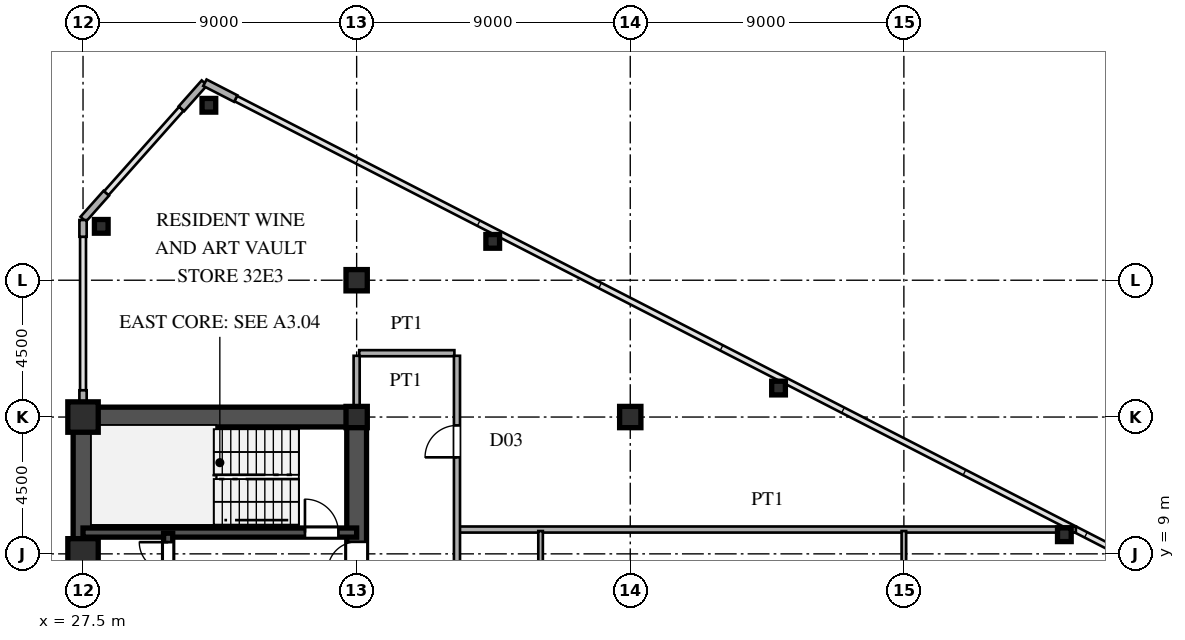
"""IFC4 building model, lengths in metres.
Left out: names, types, materials, properties, quantities, classifications, styles, units other than length and angle.
Written with IfcOpenShell. Run it as: python <this file> out.ifc"""

import sys

from ifc_helpers import new_model, si_unit, direction, frame, frame_2d, origin, origin_2d, place, context, subcontext, project, spatial, rectangle, hollow_rectangle, i_section, extrude, source, transform, mapped, element, fill, save


model = new_model("IFC4")
c1 = context("Model", 3, precision=1e-05, world=origin(), true_north=direction((0.0, 1.0)))
c2 = subcontext(c1, "Body", "Model", "MODEL_VIEW")
j1 = project(units=[si_unit("LENGTHUNIT", "METRE"), si_unit("PLANEANGLEUNIT", "RADIAN")], contexts=[c1])
p1 = place(None, origin())
s1 = spatial("IfcSite", under=j1, at=p1, CompositionType="ELEMENT")
p2 = place(p1, origin())
s2 = spatial("IfcBuilding", under=s1, at=p2, CompositionType="ELEMENT")
p3 = place(p2, frame((0.0, 0.0, 121.2)))
s3 = spatial("IfcBuildingStorey", under=s2, at=p3, CompositionType="ELEMENT", Elevation=121.2)
m1 = source(origin(), c2, "Body", "SweptSolid", [
    extrude(hollow_rectangle(XDim=1.0, YDim=1.0, WallThickness=0.042, at=origin_2d()), origin(), (0.0, 0.0, 1.0), 3.6),
])
for number, where, z_axis, x_axis in (
    (1, (27.5, 9.0, 0.0), (0.0, 0.0, 1.0), (1.0, 0.0, 0.0)),
    (2, (27.5, 13.5, 0.0), (0.0, 0.0, 1.0), (1.0, 0.0, 0.0)),
):
    element("IfcColumn", number, at=place(p3, frame(where, z_axis=z_axis, x_axis=x_axis)), inside=s3, PredefinedType="COLUMN", context=c2, shape_type="MappedRepresentation", body=[
        mapped(m1, transform((0.0, 0.0, 0.0), scale=1.0)),
    ])
m2 = source(origin(), c2, "Body", "SweptSolid", [
    extrude(i_section(OverallWidth=0.7, OverallDepth=0.7, WebThickness=0.028, FlangeThickness=0.045, at=origin_2d()), origin(), (0.0, 0.0, 1.0), 3.6),
])
for number, where, z_axis, x_axis in (
    (3, (36.5, 13.5, 0.0), (0.0, 0.0, 1.0), (1.0, 0.0, 0.0)),
    (4, (36.5, 18.0, 0.0), (0.0, 0.0, 1.0), (1.0, 0.0, 0.0)),
    (5, (45.5, 13.5, 0.0), (0.0, 0.0, 1.0), (1.0, 0.0, 0.0)),
):
    element("IfcColumn", number, at=place(p3, frame(where, z_axis=z_axis, x_axis=x_axis)), inside=s3, PredefinedType="COLUMN", context=c2, shape_type="MappedRepresentation", body=[
        mapped(m2, transform((0.0, 0.0, 0.0), scale=1.0)),
    ])
m3 = source(origin(), c2, "Body", "SweptSolid", [
    extrude(hollow_rectangle(XDim=0.45, YDim=0.45, WallThickness=0.018, at=origin_2d()), origin(), (0.0, 0.0, 1.0), 3.6),
])
for number, where, z_axis, x_axis in (
    (6, (31.64, 23.754, 0.0), (0.0, 0.0, 1.0), (1.0, 0.0, 0.0)),
    (7, (28.1, 19.772, 0.0), (0.0, 0.0, 1.0), (1.0, 0.0, 0.0)),
    (8, (40.976, 19.278, 0.0), (0.0, 0.0, 1.0), (1.0, 0.0, 0.0)),
    (9, (50.377, 14.453, 0.0), (0.0, 0.0, 1.0), (1.0, 0.0, 0.0)),
    (10, (59.779, 9.629, 0.0), (0.0, 0.0, 1.0), (1.0, 0.0, 0.0)),
):
    element("IfcColumn", number, at=place(p3, frame(where, z_axis=z_axis, x_axis=x_axis)), inside=s3, PredefinedType="COLUMN", context=c2, shape_type="MappedRepresentation", body=[
        mapped(m3, transform((0.0, 0.0, 0.0), scale=1.0)),
    ])
p4 = place(p3, frame((32.523, 23.975, 0.0), z_axis=(0.0, 0.0, 1.0), x_axis=(-0.889797395748, 0.456355776255, 0.0)))
e11 = element("IfcWall", 11, at=p4, inside=s3, PredefinedType="SOLIDWALL", context=c2, shape_type="SweptSolid", body=[
    extrude(rectangle(XDim=1.14, YDim=0.24, at=frame_2d((0.57, 0.0))), origin(), (0.0, 0.0, 1.0), 3.38),
])
for number, where, z_axis, x_axis in (
    (12, (31.493, 24.492, 0.0), (0.0, 0.0, 1.0), (-0.664, -0.747, 0.0)),
    (13, (28.264, 20.86, 0.0), (0.0, 0.0, 1.0), (-0.664, -0.747, 0.0)),
):
    element("IfcWall", number, at=place(p3, frame(where, z_axis=z_axis, x_axis=x_axis)), inside=s3, PredefinedType="SOLIDWALL", context=c2, shape_type="SweptSolid", body=[
        extrude(rectangle(XDim=1.14, YDim=0.24, at=frame_2d((0.57, 0.0))), origin(), (0.0, 0.0, 1.0), 3.38),
    ])
p5 = place(p3, frame((27.5, 13.83, 0.0), z_axis=(0.0, 0.0, 1.0), x_axis=(0.0, 1.0, 0.0)))
e14 = element("IfcWall", 14, at=p5, inside=s3, PredefinedType="SOLIDWALL", context=c2, shape_type="SweptSolid", body=[
    extrude(rectangle(XDim=0.55, YDim=0.24, at=frame_2d((0.275, 0.0))), origin(), (0.0, 0.0, 1.0), 2.88),
])
p6 = place(p3, frame((27.5, 19.43, 0.0), z_axis=(0.0, 0.0, 1.0), x_axis=(0.0, 1.0, 0.0)))
e15 = element("IfcWall", 15, at=p6, inside=s3, PredefinedType="SOLIDWALL", context=c2, shape_type="SweptSolid", body=[
    extrude(rectangle(XDim=0.55, YDim=0.24, at=frame_2d((0.275, 0.0))), origin(), (0.0, 0.0, 1.0), 3.38),
])
p7 = place(p3, frame((27.5, 1.3, 0.0), z_axis=(0.0, 0.0, 1.0), x_axis=(0.0, 1.0, 0.0)))
e16 = element("IfcWall", 16, at=p7, inside=s3, PredefinedType="SHEAR", context=c2, shape_type="SweptSolid", body=[
    extrude(rectangle(XDim=12.2, YDim=0.65, at=frame_2d((6.1, 0.0))), origin(), (0.0, 0.0, 1.0), 3.38),
])
p8 = place(p3, frame((27.5, 13.5, 0.0), z_axis=(0.0, 0.0, 1.0), x_axis=(1.0, 0.0, 0.0)))
e17 = element("IfcWall", 17, at=p8, inside=s3, PredefinedType="SHEAR", context=c2, shape_type="SweptSolid", body=[
    extrude(rectangle(XDim=9.0, YDim=0.65, at=frame_2d((4.5, 0.0))), origin(), (0.0, 0.0, 1.0), 3.38),
])
p9 = place(p3, frame((36.5, 8.2, 0.0), z_axis=(0.0, 0.0, 1.0), x_axis=(0.0, 1.0, 0.0)))
e18 = element("IfcWall", 18, at=p9, inside=s3, PredefinedType="SHEAR", context=c2, shape_type="SweptSolid", body=[
    extrude(rectangle(XDim=5.45, YDim=0.65, at=frame_2d((2.725, 0.0))), origin(), (0.0, 0.0, 1.0), 3.38),
])
p10 = place(p9, frame((0.245, 0.0, 0.0)))
e19 = element("IfcOpeningElement", 19, at=p10, cuts=e18, PredefinedType="OPENING", context=c2, shape_type="SweptSolid", body=[
    extrude(rectangle(XDim=0.95, YDim=2.15, at=frame_2d((0.475, 1.075))), frame((0.0, 0.335, 0.0), z_axis=(0.0, -1.0, 0.0), x_axis=(1.0, 0.0, 0.0)), (0.0, 0.0, 1.0), 0.67),
])
p11 = place(p3, frame((27.5, 9.7, 0.0), z_axis=(0.0, 0.0, 1.0), x_axis=(1.0, 0.0, 0.0)))
e20 = element("IfcWall", 20, at=p11, inside=s3, PredefinedType="SHEAR", context=c2, shape_type="SweptSolid", body=[
    extrude(rectangle(XDim=9.0, YDim=0.3, at=frame_2d((4.5, 0.0))), origin(), (0.0, 0.0, 1.0), 3.38),
])
p12 = place(p11, frame((7.3, 0.0, 0.0)))
e21 = element("IfcOpeningElement", 21, at=p12, cuts=e20, PredefinedType="OPENING", context=c2, shape_type="SweptSolid", body=[
    extrude(rectangle(XDim=1.1, YDim=2.2, at=frame_2d((0.55, 1.1))), frame((0.0, 0.16, 0.0), z_axis=(0.0, -1.0, 0.0), x_axis=(1.0, 0.0, 0.0)), (0.0, 0.0, 1.0), 0.32),
])
p13 = place(p3, frame((30.3, 8.15, 0.0), z_axis=(0.0, 0.0, 1.0), x_axis=(0.0, 1.0, 0.0)))
e22 = element("IfcWall", 22, at=p13, inside=s3, PredefinedType="SHEAR", context=c2, shape_type="SweptSolid", body=[
    extrude(rectangle(XDim=1.53, YDim=0.3, at=frame_2d((0.765, 0.0))), origin(), (0.0, 0.0, 1.0), 3.38),
])
p14 = place(p13, frame((0.285, 0.0, 0.0)))
e23 = element("IfcOpeningElement", 23, at=p14, cuts=e22, PredefinedType="OPENING", context=c2, shape_type="SweptSolid", body=[
    extrude(rectangle(XDim=0.95, YDim=2.15, at=frame_2d((0.475, 1.075))), frame((0.0, 0.16, 0.0), z_axis=(0.0, -1.0, 0.0), x_axis=(1.0, 0.0, 0.0)), (0.0, 0.0, 1.0), 0.32),
])
p15 = place(p3, frame((39.88, 9.8, 0.0), z_axis=(0.0, 0.0, 1.0), x_axis=(1.0, 0.0, 0.0)))
e24 = element("IfcWall", 24, at=p15, inside=s3, PredefinedType="PARTITIONING", context=c2, shape_type="SweptSolid", body=[
    extrude(rectangle(XDim=20.277, YDim=0.2, at=frame_2d((10.139, 0.0))), origin(), (0.0, 0.0, 1.0), 3.38),
])
p16 = place(p3, frame((36.585, 15.6, 0.0), z_axis=(0.0, 0.0, 1.0), x_axis=(1.0, 0.0, 0.0)))
e25 = element("IfcWall", 25, at=p16, inside=s3, PredefinedType="PARTITIONING", context=c2, shape_type="SweptSolid", body=[
    extrude(rectangle(XDim=3.13, YDim=0.2, at=frame_2d((1.565, 0.0))), origin(), (0.0, 0.0, 1.0), 3.38),
])
p17 = place(p3, frame((36.5, 13.83, 0.0), z_axis=(0.0, 0.0, 1.0), x_axis=(0.0, 1.0, 0.0)))
e26 = element("IfcWall", 26, at=p17, inside=s3, PredefinedType="PARTITIONING", context=c2, shape_type="SweptSolid", body=[
    extrude(rectangle(XDim=1.685, YDim=0.2, at=frame_2d((0.842, 0.0))), origin(), (0.0, 0.0, 1.0), 2.78),
])
p18 = place(p3, frame((39.8, -15.515, 0.0), z_axis=(0.0, 0.0, 1.0), x_axis=(0.0, 1.0, 0.0)))
e27 = element("IfcWall", 27, at=p18, inside=s3, PredefinedType="PARTITIONING", context=c2, shape_type="SweptSolid", body=[
    extrude(rectangle(XDim=31.03, YDim=0.2, at=frame_2d((15.515, 0.0))), origin(), (0.0, 0.0, 1.0), 3.38),
])
p19 = place(p18, frame((5.762, 0.0, 0.0)))
e28 = element("IfcOpeningElement", 28, at=p19, cuts=e27, PredefinedType="OPENING", context=c2, shape_type="SweptSolid", body=[
    extrude(rectangle(XDim=1.05, YDim=2.25, at=frame_2d((0.525, 1.125))), frame((0.0, 0.11, 0.0), z_axis=(0.0, -1.0, 0.0), x_axis=(1.0, 0.0, 0.0)), (0.0, 0.0, 1.0), 0.22),
])
p20 = place(p18, frame((18.301, 0.0, 0.0)))
e29 = element("IfcOpeningElement", 29, at=p20, cuts=e27, PredefinedType="OPENING", context=c2, shape_type="SweptSolid", body=[
    extrude(rectangle(XDim=1.05, YDim=2.25, at=frame_2d((0.525, 1.125))), frame((0.0, 0.11, 0.0), z_axis=(0.0, -1.0, 0.0), x_axis=(1.0, 0.0, 0.0)), (0.0, 0.0, 1.0), 0.22),
])
p21 = place(p18, frame((27.69, 0.0, 0.0)))
e30 = element("IfcOpeningElement", 30, at=p21, cuts=e27, PredefinedType="OPENING", context=c2, shape_type="SweptSolid", body=[
    extrude(rectangle(XDim=1.05, YDim=2.25, at=frame_2d((0.525, 1.125))), frame((0.0, 0.11, 0.0), z_axis=(0.0, -1.0, 0.0), x_axis=(1.0, 0.0, 0.0)), (0.0, 0.0, 1.0), 0.22),
])
p22 = place(p3, frame((42.55, 6.072, 0.0), z_axis=(0.0, 0.0, 1.0), x_axis=(0.0, 1.0, 0.0)))
e31 = element("IfcWall", 31, at=p22, inside=s3, PredefinedType="PARTITIONING", context=c2, shape_type="SweptSolid", body=[
    extrude(rectangle(XDim=3.678, YDim=0.15, at=frame_2d((1.839, 0.0))), origin(), (0.0, 0.0, 1.0), 3.38),
])
p23 = place(p3, frame((54.5, -12.732, 0.0), z_axis=(0.0, 0.0, 1.0), x_axis=(0.0, 1.0, 0.0)))
e32 = element("IfcWall", 32, at=p23, inside=s3, PredefinedType="PARTITIONING", context=c2, shape_type="SweptSolid", body=[
    extrude(rectangle(XDim=22.482, YDim=0.15, at=frame_2d((11.241, 0.0))), origin(), (0.0, 0.0, 1.0), 2.78),
])
p24 = place(p23, frame((1.837, 0.0, 0.0)))
e33 = element("IfcOpeningElement", 33, at=p24, cuts=e32, PredefinedType="OPENING", context=c2, shape_type="SweptSolid", body=[
    extrude(rectangle(XDim=0.95, YDim=2.15, at=frame_2d((0.475, 1.075))), frame((0.0, 0.085, 0.0), z_axis=(0.0, -1.0, 0.0), x_axis=(1.0, 0.0, 0.0)), (0.0, 0.0, 1.0), 0.17),
])
p25 = place(p23, frame((6.785, 0.0, 0.0)))
e34 = element("IfcOpeningElement", 34, at=p25, cuts=e32, PredefinedType="OPENING", context=c2, shape_type="SweptSolid", body=[
    extrude(rectangle(XDim=0.95, YDim=2.15, at=frame_2d((0.475, 1.075))), frame((0.0, 0.085, 0.0), z_axis=(0.0, -1.0, 0.0), x_axis=(1.0, 0.0, 0.0)), (0.0, 0.0, 1.0), 0.17),
])
p26 = place(p23, frame((15.757, 0.0, 0.0)))
e35 = element("IfcOpeningElement", 35, at=p26, cuts=e32, PredefinedType="OPENING", context=c2, shape_type="SweptSolid", body=[
    extrude(rectangle(XDim=0.95, YDim=2.15, at=frame_2d((0.475, 1.075))), frame((0.0, 0.085, 0.0), z_axis=(0.0, -1.0, 0.0), x_axis=(1.0, 0.0, 0.0)), (0.0, 0.0, 1.0), 0.17),
])
m4 = source(origin(), c2, "Body", "SweptSolid", [
    extrude(rectangle(XDim=0.95, YDim=2.15, at=frame_2d((0.475, 1.075))), frame((0.0, 0.025, 0.0), z_axis=(0.0, -1.0, 0.0), x_axis=(1.0, 0.0, 0.0)), (0.0, 0.0, 1.0), 0.05),
])
p27 = place(p10, origin())
e36 = element("IfcDoor", 36, at=p27, inside=s3, OperationType="SINGLE_SWING_LEFT", PredefinedType="DOOR", context=c2, shape_type="MappedRepresentation", body=[
    mapped(m4, transform((0.0, 0.0, 0.0), scale=1.0)),
])
fill(e19, e36)
m5 = source(origin(), c2, "Body", "SweptSolid", [
    extrude(rectangle(XDim=1.1, YDim=2.2, at=frame_2d((0.55, 1.1))), frame((0.0, 0.025, 0.0), z_axis=(0.0, -1.0, 0.0), x_axis=(1.0, 0.0, 0.0)), (0.0, 0.0, 1.0), 0.05),
])
p28 = place(p12, origin())
e37 = element("IfcDoor", 37, at=p28, inside=s3, OperationType="SINGLE_SWING_LEFT", PredefinedType="DOOR", context=c2, shape_type="MappedRepresentation", body=[
    mapped(m5, transform((0.0, 0.0, 0.0), scale=1.0)),
])
fill(e21, e37)
p29 = place(p14, origin())
e38 = element("IfcDoor", 38, at=p29, inside=s3, OperationType="SINGLE_SWING_RIGHT", PredefinedType="DOOR", context=c2, shape_type="MappedRepresentation", body=[
    mapped(m4, transform((0.0, 0.0, 0.0), scale=1.0)),
])
fill(e23, e38)
m6 = source(origin(), c2, "Body", "SweptSolid", [
    extrude(rectangle(XDim=1.05, YDim=2.25, at=frame_2d((0.525, 1.125))), frame((0.0, 0.025, 0.0), z_axis=(0.0, -1.0, 0.0), x_axis=(1.0, 0.0, 0.0)), (0.0, 0.0, 1.0), 0.05),
])
p30 = place(p21, origin())
e39 = element("IfcDoor", 39, at=p30, inside=s3, OperationType="SINGLE_SWING_LEFT", PredefinedType="DOOR", context=c2, shape_type="MappedRepresentation", body=[
    mapped(m6, transform((0.0, 0.0, 0.0), scale=1.0)),
])
fill(e30, e39)
save(model, sys.argv[1])
